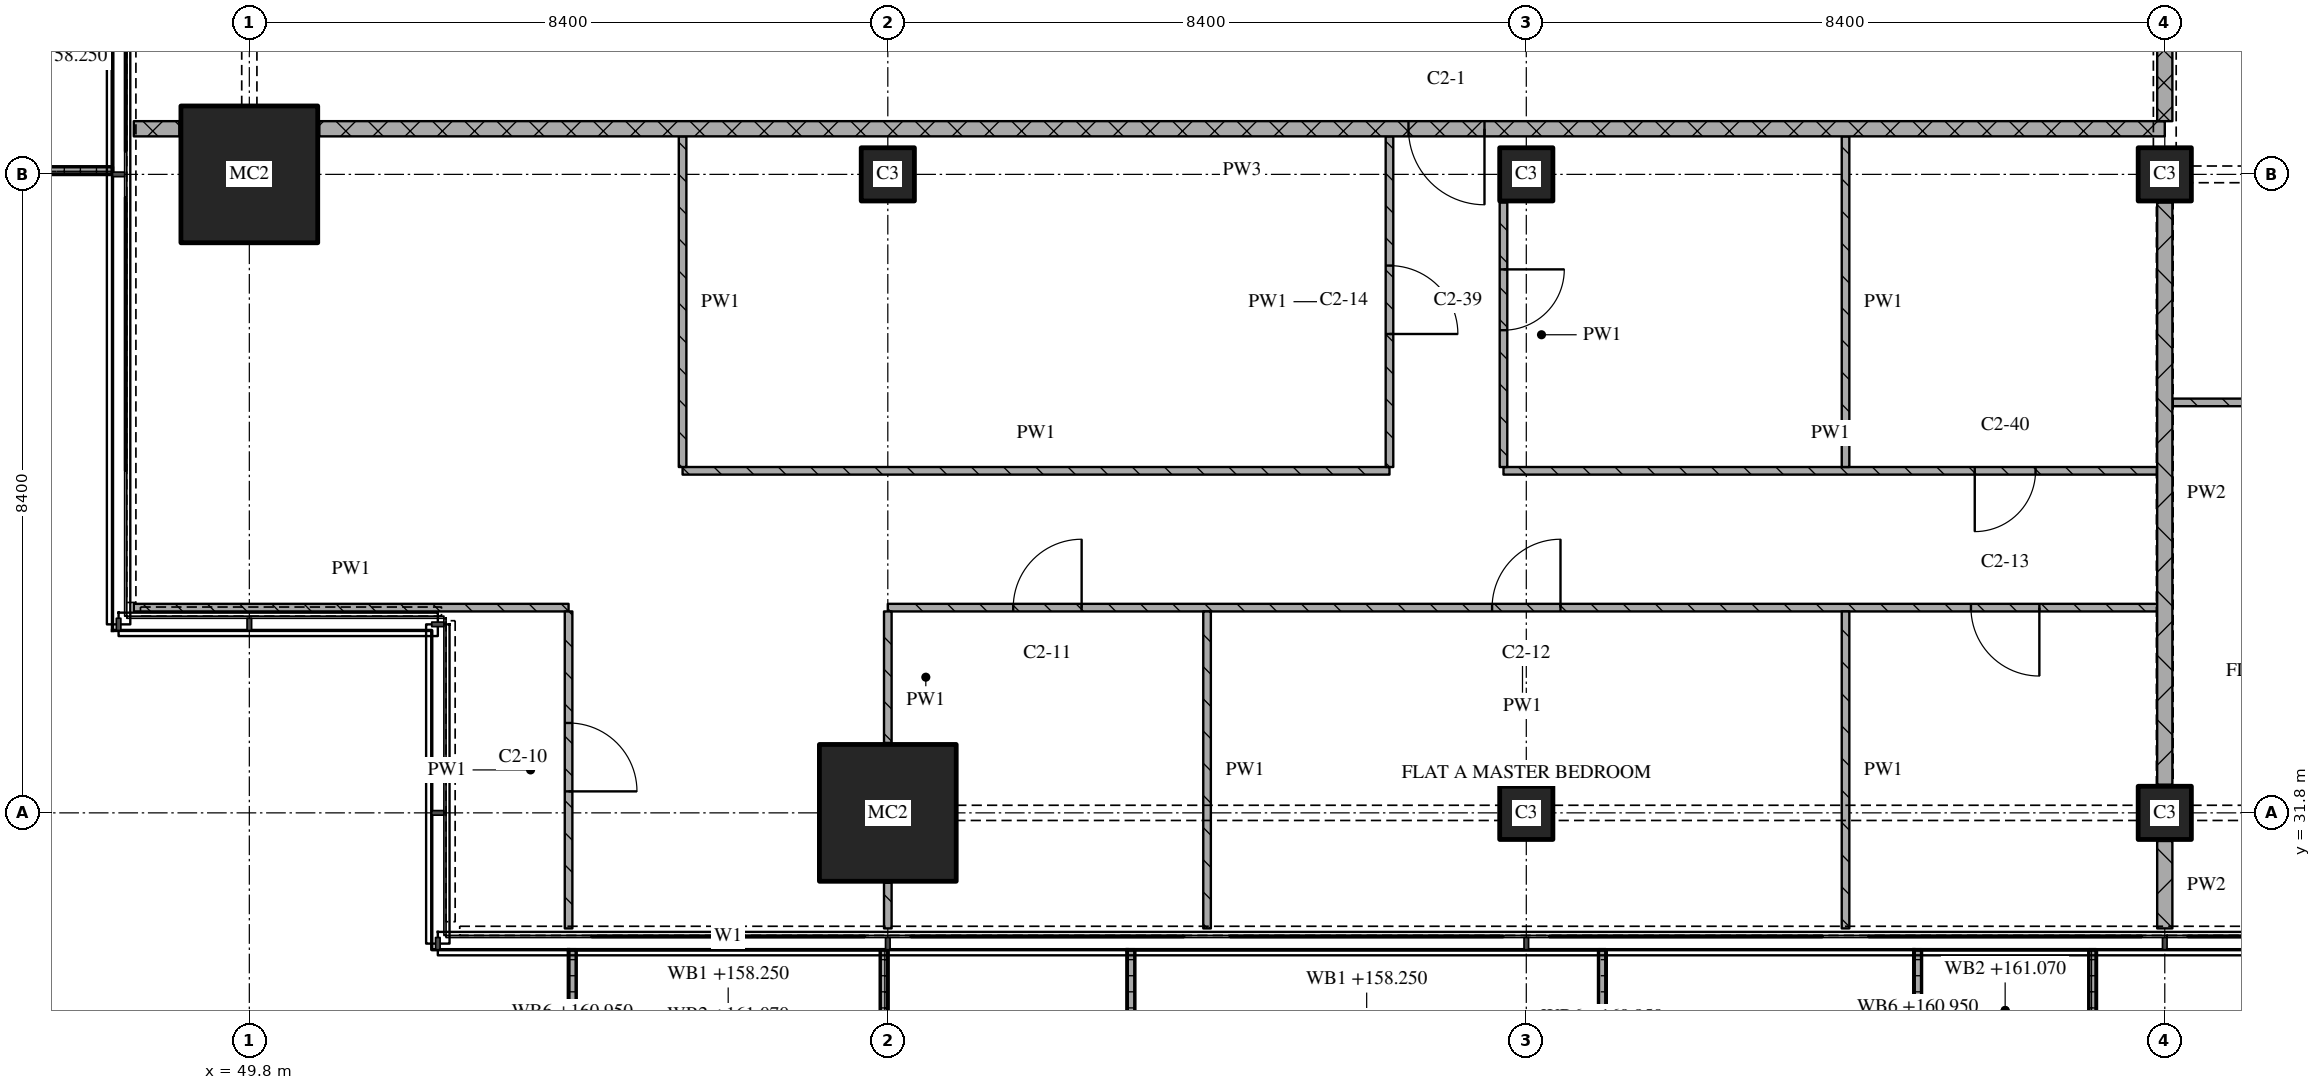
"""IFC4 building model, lengths in metres.
Left out: names, types, materials, properties, quantities, classifications, styles, units other than length and angle.
Written with IfcOpenShell. Run it as: python <this file> out.ifc"""

import sys

from ifc_helpers import new_model, si_unit, direction, frame, frame_2d, origin, origin_2d, place, context, subcontext, project, spatial, polyline, rectangle, outline, extrude, element, fill, save


model = new_model("IFC4")
c1 = context("Model", 3, precision=1e-05, world=origin(), true_north=direction((0.0, 1.0)))
c2 = subcontext(c1, "Body", "Model", "MODEL_VIEW")
j1 = project(units=[si_unit("LENGTHUNIT", "METRE"), si_unit("PLANEANGLEUNIT", "RADIAN")], contexts=[c1])
p1 = place(None, origin())
s1 = spatial("IfcSite", under=j1, at=p1, CompositionType="ELEMENT")
p2 = place(p1, origin())
s2 = spatial("IfcBuilding", under=s1, at=p2, CompositionType="ELEMENT")
p3 = place(p2, frame((0.0, 0.0, 158.25)))
s3 = spatial("IfcBuildingStorey", under=s2, at=p3, CompositionType="ELEMENT", Elevation=158.25)
for number, where, z_axis, x_axis in (
    (1, (49.8, 40.2, 0.0), (0.0, 0.0, 1.0), (1.0, 0.0, 0.0)),
    (2, (58.2, 31.8, 0.0), (0.0, 0.0, 1.0), (1.0, 0.0, 0.0)),
):
    element("IfcColumn", number, at=place(p3, frame(where, z_axis=z_axis, x_axis=x_axis)), inside=s3, PredefinedType="COLUMN", context=c2, shape_type="SweptSolid", body=[
        extrude(rectangle(XDim=1.8, YDim=1.8, at=origin_2d()), origin(), (0.0, 0.0, 1.0), 3.6),
    ])
for number, where, z_axis, x_axis in (
    (3, (58.2, 40.2, 0.0), (0.0, 0.0, 1.0), (1.0, 0.0, 0.0)),
    (4, (66.6, 31.8, 0.0), (0.0, 0.0, 1.0), (1.0, 0.0, 0.0)),
    (5, (66.6, 40.2, 0.0), (0.0, 0.0, 1.0), (1.0, 0.0, 0.0)),
    (6, (75.0, 31.8, 0.0), (0.0, 0.0, 1.0), (1.0, 0.0, 0.0)),
    (7, (75.0, 40.2, 0.0), (0.0, 0.0, 1.0), (1.0, 0.0, 0.0)),
):
    element("IfcColumn", number, at=place(p3, frame(where, z_axis=z_axis, x_axis=x_axis)), inside=s3, PredefinedType="COLUMN", context=c2, shape_type="SweptSolid", body=[
        extrude(rectangle(XDim=0.7, YDim=0.7, at=origin_2d()), origin(), (0.0, 0.0, 1.0), 3.6),
    ])
p4 = place(p3, origin())
e8 = element("IfcWall", 8, at=p4, inside=s3, PredefinedType="SOLIDWALL", context=c2, shape_type="SweptSolid", body=[
    extrude(outline(polyline([(54.0, 30.0), (54.1, 30.0), (54.1, 28.367), (58.1, 28.367), (58.1, 30.0), (58.2, 30.0), (58.2, 28.267), (54.0, 28.267), (54.0, 30.0)])), origin(), (0.0, 0.0, 1.0), 1.0),
])
p5 = place(p3, origin())
e9 = element("IfcWall", 9, at=p5, inside=s3, PredefinedType="SOLIDWALL", context=c2, shape_type="SweptSolid", body=[
    extrude(outline(polyline([(61.35, 30.0), (61.45, 30.0), (61.45, 28.233), (67.55, 28.233), (67.55, 30.0), (67.65, 30.0), (67.65, 28.133), (61.35, 28.133), (61.35, 30.0)])), origin(), (0.0, 0.0, 1.0), 1.0),
])
p6 = place(p3, origin())
e10 = element("IfcWall", 10, at=p6, inside=s3, PredefinedType="SOLIDWALL", context=c2, shape_type="SweptSolid", body=[
    extrude(outline(polyline([(71.7, 30.0), (71.8, 30.0), (71.8, 28.5), (74.0, 28.5), (74.0, 30.0), (74.1, 30.0), (74.1, 28.4), (71.7, 28.4), (71.7, 30.0)])), origin(), (0.0, 0.0, 1.0), 1.0),
])
p7 = place(p3, origin())
e11 = element("IfcWall", 11, at=p7, inside=s3, PredefinedType="SOLIDWALL", context=c2, shape_type="SweptSolid", body=[
    extrude(outline(polyline([(48.0, 44.4), (48.0, 44.3), (46.367, 44.3), (46.367, 40.3), (48.0, 40.3), (48.0, 40.2), (46.267, 40.2), (46.267, 44.4), (48.0, 44.4)])), origin(), (0.0, 0.0, 1.0), 1.0),
])
p8 = place(p3, frame((48.28, 34.5, 0.0), z_axis=(0.0, 0.0, 1.0), x_axis=(1.0, 0.0, 0.0)))
e12 = element("IfcWall", 12, at=p8, inside=s3, PredefinedType="PARTITIONING", context=c2, shape_type="SweptSolid", body=[
    extrude(rectangle(XDim=5.72, YDim=0.1, at=frame_2d((2.86, 0.0))), origin(), (0.0, 0.0, 1.0), 3.32),
])
p9 = place(p3, frame((74.9, 34.5, 0.0), z_axis=(0.0, 0.0, 1.0), x_axis=(-1.0, 0.0, 0.0)))
e13 = element("IfcWall", 13, at=p9, inside=s3, PredefinedType="PARTITIONING", context=c2, shape_type="SweptSolid", body=[
    extrude(rectangle(XDim=16.7, YDim=0.1, at=frame_2d((8.35, 0.0))), origin(), (0.0, 0.0, 1.0), 3.32),
])
p10 = place(p9, frame((1.55, 0.0, 0.0)))
e14 = element("IfcOpeningElement", 14, at=p10, cuts=e13, PredefinedType="OPENING", context=c2, shape_type="SweptSolid", body=[
    extrude(rectangle(XDim=0.9, YDim=2.1, at=frame_2d((0.45, 1.05))), frame((0.0, 0.06, 0.0), z_axis=(0.0, -1.0, 0.0), x_axis=(1.0, 0.0, 0.0)), (0.0, 0.0, 1.0), 0.12),
])
p11 = place(p9, frame((7.85, 0.0, 0.0)))
e15 = element("IfcOpeningElement", 15, at=p11, cuts=e13, PredefinedType="OPENING", context=c2, shape_type="SweptSolid", body=[
    extrude(rectangle(XDim=0.9, YDim=2.1, at=frame_2d((0.45, 1.05))), frame((0.0, 0.06, 0.0), z_axis=(0.0, -1.0, 0.0), x_axis=(1.0, 0.0, 0.0)), (0.0, 0.0, 1.0), 0.12),
])
p12 = place(p9, frame((14.15, 0.0, 0.0)))
e16 = element("IfcOpeningElement", 16, at=p12, cuts=e13, PredefinedType="OPENING", context=c2, shape_type="SweptSolid", body=[
    extrude(rectangle(XDim=0.9, YDim=2.1, at=frame_2d((0.45, 1.05))), frame((0.0, 0.06, 0.0), z_axis=(0.0, -1.0, 0.0), x_axis=(1.0, 0.0, 0.0)), (0.0, 0.0, 1.0), 0.12),
])
p13 = place(p3, frame((55.5, 36.3, 0.0), z_axis=(0.0, 0.0, 1.0), x_axis=(1.0, 0.0, 0.0)))
e17 = element("IfcWall", 17, at=p13, inside=s3, PredefinedType="PARTITIONING", context=c2, shape_type="SweptSolid", body=[
    extrude(rectangle(XDim=9.3, YDim=0.1, at=frame_2d((4.65, 0.0))), origin(), (0.0, 0.0, 1.0), 3.32),
])
p14 = place(p3, frame((66.3, 36.3, 0.0), z_axis=(0.0, 0.0, 1.0), x_axis=(1.0, 0.0, 0.0)))
e18 = element("IfcWall", 18, at=p14, inside=s3, PredefinedType="PARTITIONING", context=c2, shape_type="SweptSolid", body=[
    extrude(rectangle(XDim=8.6, YDim=0.1, at=frame_2d((4.3, 0.0))), origin(), (0.0, 0.0, 1.0), 3.32),
])
p15 = place(p14, frame((6.2, 0.0, 0.0)))
e19 = element("IfcOpeningElement", 19, at=p15, cuts=e18, PredefinedType="OPENING", context=c2, shape_type="SweptSolid", body=[
    extrude(rectangle(XDim=0.8, YDim=2.1, at=frame_2d((0.4, 1.05))), frame((0.0, 0.06, 0.0), z_axis=(0.0, -1.0, 0.0), x_axis=(1.0, 0.0, 0.0)), (0.0, 0.0, 1.0), 0.12),
])
p16 = place(p3, frame((75.1, 37.2, 0.0), z_axis=(0.0, 0.0, 1.0), x_axis=(1.0, 0.0, 0.0)))
e20 = element("IfcWall", 20, at=p16, inside=s3, PredefinedType="PARTITIONING", context=c2, shape_type="SweptSolid", body=[
    extrude(rectangle(XDim=11.3, YDim=0.1, at=frame_2d((5.65, 0.0))), origin(), (0.0, 0.0, 1.0), 3.32),
])
p17 = place(p16, frame((1.708, 0.0, 0.0)))
e21 = element("IfcOpeningElement", 21, at=p17, cuts=e20, PredefinedType="OPENING", context=c2, shape_type="SweptSolid", body=[
    extrude(rectangle(XDim=0.8, YDim=2.1, at=frame_2d((0.4, 1.05))), frame((0.0, 0.06, 0.0), z_axis=(0.0, -1.0, 0.0), x_axis=(1.0, 0.0, 0.0)), (0.0, 0.0, 1.0), 0.12),
])
p18 = place(p16, frame((6.125, 0.0, 0.0)))
e22 = element("IfcOpeningElement", 22, at=p18, cuts=e20, PredefinedType="OPENING", context=c2, shape_type="SweptSolid", body=[
    extrude(rectangle(XDim=0.8, YDim=2.1, at=frame_2d((0.4, 1.05))), frame((0.0, 0.06, 0.0), z_axis=(0.0, -1.0, 0.0), x_axis=(1.0, 0.0, 0.0)), (0.0, 0.0, 1.0), 0.12),
])
p19 = place(p16, frame((9.567, 0.0, 0.0)))
e23 = element("IfcOpeningElement", 23, at=p19, cuts=e20, PredefinedType="OPENING", context=c2, shape_type="SweptSolid", body=[
    extrude(rectangle(XDim=0.9, YDim=2.1, at=frame_2d((0.45, 1.05))), frame((0.0, 0.06, 0.0), z_axis=(0.0, -1.0, 0.0), x_axis=(1.0, 0.0, 0.0)), (0.0, 0.0, 1.0), 0.12),
])
p20 = place(p3, frame((48.28, 40.8, 0.0), z_axis=(0.0, 0.0, 1.0), x_axis=(1.0, 0.0, 0.0)))
e24 = element("IfcWall", 24, at=p20, inside=s3, PredefinedType="PARTITIONING", context=c2, shape_type="SweptSolid", body=[
    extrude(rectangle(XDim=0.6, YDim=0.2, at=frame_2d((0.3, 0.0))), origin(), (0.0, 0.0, 1.0), 3.32),
])
p21 = place(p3, frame((75.0, 40.8, 0.0), z_axis=(0.0, 0.0, 1.0), x_axis=(-1.0, 0.0, 0.0)))
e25 = element("IfcWall", 25, at=p21, inside=s3, PredefinedType="PARTITIONING", context=c2, shape_type="SweptSolid", body=[
    extrude(rectangle(XDim=24.28, YDim=0.2, at=frame_2d((12.14, 0.0))), origin(), (0.0, 0.0, 1.0), 3.32),
])
p22 = place(p21, frame((8.95, 0.0, 0.0)))
e26 = element("IfcOpeningElement", 26, at=p22, cuts=e25, PredefinedType="OPENING", context=c2, shape_type="SweptSolid", body=[
    extrude(rectangle(XDim=1.0, YDim=2.1, at=frame_2d((0.5, 1.05))), frame((0.0, 0.11, 0.0), z_axis=(0.0, -1.0, 0.0), x_axis=(1.0, 0.0, 0.0)), (0.0, 0.0, 1.0), 0.22),
])
p23 = place(p3, frame((54.0, 30.28, 0.0), z_axis=(0.0, 0.0, 1.0), x_axis=(0.0, 1.0, 0.0)))
e27 = element("IfcWall", 27, at=p23, inside=s3, PredefinedType="PARTITIONING", context=c2, shape_type="SweptSolid", body=[
    extrude(rectangle(XDim=4.17, YDim=0.1, at=frame_2d((2.085, 0.0))), origin(), (0.0, 0.0, 1.0), 3.32),
])
p24 = place(p23, frame((1.803, 0.0, 0.0)))
e28 = element("IfcOpeningElement", 28, at=p24, cuts=e27, PredefinedType="OPENING", context=c2, shape_type="SweptSolid", body=[
    extrude(rectangle(XDim=0.9, YDim=2.1, at=frame_2d((0.45, 1.05))), frame((0.0, 0.06, 0.0), z_axis=(0.0, -1.0, 0.0), x_axis=(1.0, 0.0, 0.0)), (0.0, 0.0, 1.0), 0.12),
])
p25 = place(p3, frame((55.5, 40.7, 0.0), z_axis=(0.0, 0.0, 1.0), x_axis=(0.0, -1.0, 0.0)))
e29 = element("IfcWall", 29, at=p25, inside=s3, PredefinedType="PARTITIONING", context=c2, shape_type="SweptSolid", body=[
    extrude(rectangle(XDim=4.35, YDim=0.1, at=frame_2d((2.175, 0.0))), origin(), (0.0, 0.0, 1.0), 3.32),
])
p26 = place(p3, frame((58.2, 30.88, 0.0), z_axis=(0.0, 0.0, 1.0), x_axis=(0.0, -1.0, 0.0)))
e30 = element("IfcWall", 30, at=p26, inside=s3, PredefinedType="PARTITIONING", context=c2, shape_type="SweptSolid", body=[
    extrude(rectangle(XDim=0.6, YDim=0.1, at=frame_2d((0.3, 0.0))), origin(), (0.0, 0.0, 1.0), 3.32),
])
p27 = place(p3, frame((58.2, 34.45, 0.0), z_axis=(0.0, 0.0, 1.0), x_axis=(0.0, -1.0, 0.0)))
e31 = element("IfcWall", 31, at=p27, inside=s3, PredefinedType="PARTITIONING", context=c2, shape_type="SweptSolid", body=[
    extrude(rectangle(XDim=1.73, YDim=0.1, at=frame_2d((0.865, 0.0))), origin(), (0.0, 0.0, 1.0), 3.32),
])
p28 = place(p3, frame((62.4, 34.45, 0.0), z_axis=(0.0, 0.0, 1.0), x_axis=(0.0, -1.0, 0.0)))
e32 = element("IfcWall", 32, at=p28, inside=s3, PredefinedType="PARTITIONING", context=c2, shape_type="SweptSolid", body=[
    extrude(rectangle(XDim=4.17, YDim=0.1, at=frame_2d((2.085, 0.0))), origin(), (0.0, 0.0, 1.0), 3.32),
])
p29 = place(p3, frame((64.8, 36.35, 0.0), z_axis=(0.0, 0.0, 1.0), x_axis=(0.0, 1.0, 0.0)))
e33 = element("IfcWall", 33, at=p29, inside=s3, PredefinedType="PARTITIONING", context=c2, shape_type="SweptSolid", body=[
    extrude(rectangle(XDim=4.35, YDim=0.1, at=frame_2d((2.175, 0.0))), origin(), (0.0, 0.0, 1.0), 3.32),
])
p30 = place(p29, frame((1.75, 0.0, 0.0)))
e34 = element("IfcOpeningElement", 34, at=p30, cuts=e33, PredefinedType="OPENING", context=c2, shape_type="SweptSolid", body=[
    extrude(rectangle(XDim=0.9, YDim=2.1, at=frame_2d((0.45, 1.05))), frame((0.0, 0.06, 0.0), z_axis=(0.0, -1.0, 0.0), x_axis=(1.0, 0.0, 0.0)), (0.0, 0.0, 1.0), 0.12),
])
p31 = place(p3, frame((66.3, 39.83, 0.0), z_axis=(0.0, 0.0, 1.0), x_axis=(0.0, -1.0, 0.0)))
e35 = element("IfcWall", 35, at=p31, inside=s3, PredefinedType="PARTITIONING", context=c2, shape_type="SweptSolid", body=[
    extrude(rectangle(XDim=3.48, YDim=0.1, at=frame_2d((1.74, 0.0))), origin(), (0.0, 0.0, 1.0), 3.32),
])
p32 = place(p31, frame((0.88, 0.0, 0.0)))
e36 = element("IfcOpeningElement", 36, at=p32, cuts=e35, PredefinedType="OPENING", context=c2, shape_type="SweptSolid", body=[
    extrude(rectangle(XDim=0.8, YDim=2.1, at=frame_2d((0.4, 1.05))), frame((0.0, 0.06, 0.0), z_axis=(0.0, -1.0, 0.0), x_axis=(1.0, 0.0, 0.0)), (0.0, 0.0, 1.0), 0.12),
])
p33 = place(p3, frame((70.8, 34.45, 0.0), z_axis=(0.0, 0.0, 1.0), x_axis=(0.0, -1.0, 0.0)))
e37 = element("IfcWall", 37, at=p33, inside=s3, PredefinedType="PARTITIONING", context=c2, shape_type="SweptSolid", body=[
    extrude(rectangle(XDim=4.17, YDim=0.1, at=frame_2d((2.085, 0.0))), origin(), (0.0, 0.0, 1.0), 3.32),
])
p34 = place(p3, frame((70.8, 40.7, 0.0), z_axis=(0.0, 0.0, 1.0), x_axis=(0.0, -1.0, 0.0)))
e38 = element("IfcWall", 38, at=p34, inside=s3, PredefinedType="PARTITIONING", context=c2, shape_type="SweptSolid", body=[
    extrude(rectangle(XDim=4.35, YDim=0.1, at=frame_2d((2.175, 0.0))), origin(), (0.0, 0.0, 1.0), 3.32),
])
p35 = place(p3, frame((75.0, 43.1, 0.0), z_axis=(0.0, 0.0, 1.0), x_axis=(0.0, -1.0, 0.0)))
e39 = element("IfcWall", 39, at=p35, inside=s3, PredefinedType="PARTITIONING", context=c2, shape_type="SweptSolid", body=[
    extrude(rectangle(XDim=2.2, YDim=0.2, at=frame_2d((1.1, 0.0))), origin(), (0.0, 0.0, 1.0), 2.43),
])
p36 = place(p3, frame((75.0, 31.43, 0.0), z_axis=(0.0, 0.0, 1.0), x_axis=(0.0, -1.0, 0.0)))
e40 = element("IfcWall", 40, at=p36, inside=s3, PredefinedType="PARTITIONING", context=c2, shape_type="SweptSolid", body=[
    extrude(rectangle(XDim=1.15, YDim=0.2, at=frame_2d((0.575, 0.0))), origin(), (0.0, 0.0, 1.0), 3.32),
])
p37 = place(p3, frame((75.0, 39.83, 0.0), z_axis=(0.0, 0.0, 1.0), x_axis=(0.0, -1.0, 0.0)))
e41 = element("IfcWall", 41, at=p37, inside=s3, PredefinedType="PARTITIONING", context=c2, shape_type="SweptSolid", body=[
    extrude(rectangle(XDim=7.66, YDim=0.2, at=frame_2d((3.83, 0.0))), origin(), (0.0, 0.0, 1.0), 2.72),
])
p38 = place(p10, origin())
e42 = element("IfcDoor", 42, at=p38, inside=s3, OperationType="SINGLE_SWING_LEFT", PredefinedType="DOOR", context=c2, shape_type="SweptSolid", body=[
    extrude(rectangle(XDim=0.9, YDim=2.1, at=frame_2d((0.45, 1.05))), frame((0.0, 0.025, 0.0), z_axis=(0.0, -1.0, 0.0), x_axis=(1.0, 0.0, 0.0)), (0.0, 0.0, 1.0), 0.05),
])
fill(e14, e42)
p39 = place(p11, origin())
e43 = element("IfcDoor", 43, at=p39, inside=s3, OperationType="SINGLE_SWING_RIGHT", PredefinedType="DOOR", context=c2, shape_type="SweptSolid", body=[
    extrude(rectangle(XDim=0.9, YDim=2.1, at=frame_2d((0.45, 1.05))), frame((0.0, 0.025, 0.0), z_axis=(0.0, -1.0, 0.0), x_axis=(1.0, 0.0, 0.0)), (0.0, 0.0, 1.0), 0.05),
])
fill(e15, e43)
p40 = place(p12, origin())
e44 = element("IfcDoor", 44, at=p40, inside=s3, OperationType="SINGLE_SWING_RIGHT", PredefinedType="DOOR", context=c2, shape_type="SweptSolid", body=[
    extrude(rectangle(XDim=0.9, YDim=2.1, at=frame_2d((0.45, 1.05))), frame((0.0, 0.025, 0.0), z_axis=(0.0, -1.0, 0.0), x_axis=(1.0, 0.0, 0.0)), (0.0, 0.0, 1.0), 0.05),
])
fill(e16, e44)
p41 = place(p15, origin())
e45 = element("IfcDoor", 45, at=p41, inside=s3, OperationType="SINGLE_SWING_RIGHT", PredefinedType="DOOR", context=c2, shape_type="SweptSolid", body=[
    extrude(rectangle(XDim=0.8, YDim=2.1, at=frame_2d((0.4, 1.05))), frame((0.0, 0.025, 0.0), z_axis=(0.0, -1.0, 0.0), x_axis=(1.0, 0.0, 0.0)), (0.0, 0.0, 1.0), 0.05),
])
fill(e19, e45)
p42 = place(p22, origin())
e46 = element("IfcDoor", 46, at=p42, inside=s3, OperationType="SINGLE_SWING_LEFT", PredefinedType="DOOR", context=c2, shape_type="SweptSolid", body=[
    extrude(rectangle(XDim=1.0, YDim=2.1, at=frame_2d((0.5, 1.05))), frame((0.0, 0.025, 0.0), z_axis=(0.0, -1.0, 0.0), x_axis=(1.0, 0.0, 0.0)), (0.0, 0.0, 1.0), 0.05),
])
fill(e26, e46)
p43 = place(p24, origin())
e47 = element("IfcDoor", 47, at=p43, inside=s3, OperationType="SINGLE_SWING_RIGHT", PredefinedType="DOOR", context=c2, shape_type="SweptSolid", body=[
    extrude(rectangle(XDim=0.9, YDim=2.1, at=frame_2d((0.45, 1.05))), frame((0.0, 0.025, 0.0), z_axis=(0.0, -1.0, 0.0), x_axis=(1.0, 0.0, 0.0)), (0.0, 0.0, 1.0), 0.05),
])
fill(e28, e47)
p44 = place(p30, origin())
e48 = element("IfcDoor", 48, at=p44, inside=s3, OperationType="SINGLE_SWING_RIGHT", PredefinedType="DOOR", context=c2, shape_type="SweptSolid", body=[
    extrude(rectangle(XDim=0.9, YDim=2.1, at=frame_2d((0.45, 1.05))), frame((0.0, 0.025, 0.0), z_axis=(0.0, -1.0, 0.0), x_axis=(1.0, 0.0, 0.0)), (0.0, 0.0, 1.0), 0.05),
])
fill(e34, e48)
p45 = place(p32, origin())
e49 = element("IfcDoor", 49, at=p45, inside=s3, OperationType="SINGLE_SWING_LEFT", PredefinedType="DOOR", context=c2, shape_type="SweptSolid", body=[
    extrude(rectangle(XDim=0.8, YDim=2.1, at=frame_2d((0.4, 1.05))), frame((0.0, 0.025, 0.0), z_axis=(0.0, -1.0, 0.0), x_axis=(1.0, 0.0, 0.0)), (0.0, 0.0, 1.0), 0.05),
])
fill(e36, e49)
save(model, sys.argv[1])
